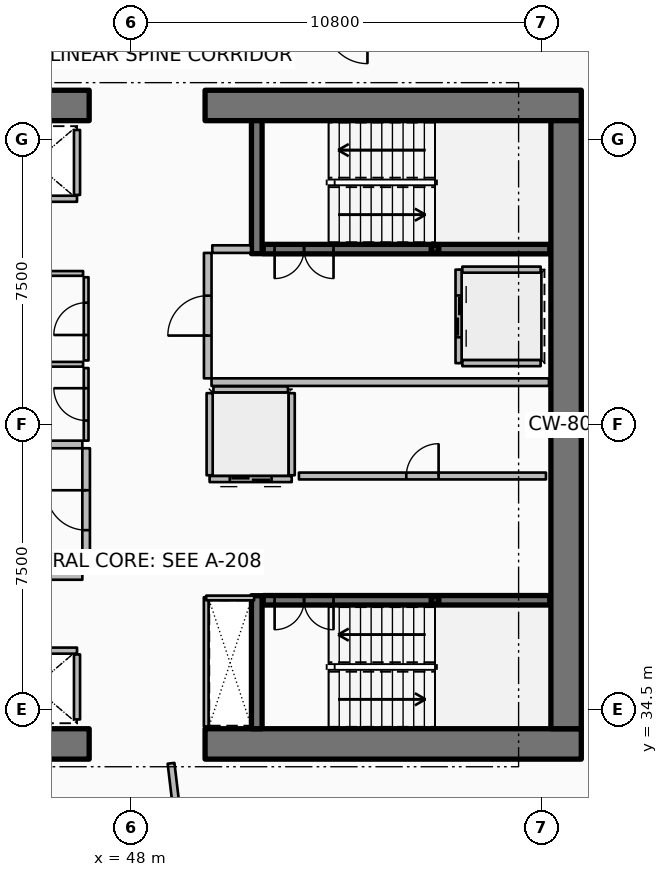
"""IFC4 building model, lengths in metres.
Left out: names, types, materials, properties, quantities, classifications, styles, units other than length and angle.
Written with IfcOpenShell. Run it as: python <this file> out.ifc"""

import sys

from ifc_helpers import new_model, si_unit, direction, frame, frame_2d, origin, origin_2d, place, context, subcontext, project, spatial, rectangle, hollow_rectangle, extrude, element, fill, save


model = new_model("IFC4")
c1 = context("Model", 3, precision=1e-05, world=origin(), true_north=direction((0.0, 1.0)))
c2 = subcontext(c1, "Body", "Model", "MODEL_VIEW")
j1 = project(units=[si_unit("LENGTHUNIT", "METRE"), si_unit("PLANEANGLEUNIT", "RADIAN")], contexts=[c1])
p1 = place(None, origin())
s1 = spatial("IfcSite", under=j1, at=p1, CompositionType="ELEMENT")
p2 = place(p1, origin())
s2 = spatial("IfcBuilding", under=s1, at=p2, CompositionType="ELEMENT")
p3 = place(p2, frame((0.0, 0.0, 157.8)))
s3 = spatial("IfcBuildingStorey", under=s2, at=p3, CompositionType="ELEMENT", Elevation=157.8)
p4 = place(p3, frame((37.0, 33.6, 0.0), z_axis=(0.0, 0.0, 1.0), x_axis=(1.0, 0.0, 0.0)))
e1 = element("IfcWall", 1, at=p4, inside=s3, PredefinedType="SHEAR", context=c2, shape_type="SweptSolid", body=[
    extrude(rectangle(XDim=9.9, YDim=0.8, at=frame_2d((4.95, 0.0))), origin(), (0.0, 0.0, 1.0), 3.75),
])
p5 = place(p3, frame((49.95, 33.6, 0.0), z_axis=(0.0, 0.0, 1.0), x_axis=(1.0, 0.0, 0.0)))
e2 = element("IfcWall", 2, at=p5, inside=s3, PredefinedType="SHEAR", context=c2, shape_type="SweptSolid", body=[
    extrude(rectangle(XDim=9.9, YDim=0.8, at=frame_2d((4.95, 0.0))), origin(), (0.0, 0.0, 1.0), 3.75),
])
p6 = place(p3, frame((37.0, 50.4, 0.0), z_axis=(0.0, 0.0, 1.0), x_axis=(1.0, 0.0, 0.0)))
e3 = element("IfcWall", 3, at=p6, inside=s3, PredefinedType="SHEAR", context=c2, shape_type="SweptSolid", body=[
    extrude(rectangle(XDim=9.9, YDim=0.8, at=frame_2d((4.95, 0.0))), origin(), (0.0, 0.0, 1.0), 3.75),
])
p7 = place(p3, frame((49.95, 50.4, 0.0), z_axis=(0.0, 0.0, 1.0), x_axis=(1.0, 0.0, 0.0)))
e4 = element("IfcWall", 4, at=p7, inside=s3, PredefinedType="SHEAR", context=c2, shape_type="SweptSolid", body=[
    extrude(rectangle(XDim=9.9, YDim=0.8, at=frame_2d((4.95, 0.0))), origin(), (0.0, 0.0, 1.0), 3.75),
])
p8 = place(p3, frame((59.45, 34.0, 0.0), z_axis=(0.0, 0.0, 1.0), x_axis=(0.0, 1.0, 0.0)))
e5 = element("IfcWall", 5, at=p8, inside=s3, PredefinedType="SHEAR", context=c2, shape_type="SweptSolid", body=[
    extrude(rectangle(XDim=16.0, YDim=0.8, at=frame_2d((8.0, 0.0))), origin(), (0.0, 0.0, 1.0), 3.75),
])
for number, where, z_axis, x_axis in (
    (6, (51.31, 46.5, 0.0), (0.0, 0.0, 1.0), (0.0, 1.0, 0.0)),
    (7, (51.31, 34.0, 0.0), (0.0, 0.0, 1.0), (0.0, 1.0, 0.0)),
):
    element("IfcWall", number, at=place(p3, frame(where, z_axis=z_axis, x_axis=x_axis)), inside=s3, PredefinedType="SHEAR", context=c2, shape_type="SweptSolid", body=[
        extrude(rectangle(XDim=3.5, YDim=0.28, at=frame_2d((1.75, 0.0))), origin(), (0.0, 0.0, 1.0), 3.75),
    ])
for number, where, z_axis, x_axis in (
    (8, (56.0, 46.62, 0.0), (0.0, 0.0, 1.0), (1.0, 0.0, 0.0)),
    (9, (56.0, 37.38, 0.0), (0.0, 0.0, 1.0), (1.0, 0.0, 0.0)),
):
    element("IfcColumn", number, at=place(p3, frame(where, z_axis=z_axis, x_axis=x_axis)), inside=s3, PredefinedType="COLUMN", context=c2, shape_type="SweptSolid", body=[
        extrude(hollow_rectangle(XDim=0.2, YDim=0.2, WallThickness=0.01, InnerFilletRadius=0.01, OuterFilletRadius=0.02, at=origin_2d()), origin(), (0.0, 0.0, 1.0), 1.67),
    ])
p9 = place(p3, frame((51.48, 46.62, 0.0), z_axis=(0.0, 0.0, 1.0), x_axis=(1.0, 0.0, 0.0)))
e10 = element("IfcWall", 10, at=p9, inside=s3, PredefinedType="SOLIDWALL", context=c2, shape_type="SweptSolid", body=[
    extrude(rectangle(XDim=7.54, YDim=0.25, at=frame_2d((3.77, 0.0))), origin(), (0.0, 0.0, 1.0), 3.5),
])
p10 = place(p9, frame((0.3, 0.0, 0.0)))
e11 = element("IfcOpeningElement", 11, at=p10, cuts=e10, PredefinedType="OPENING", context=c2, shape_type="SweptSolid", body=[
    extrude(rectangle(XDim=1.55, YDim=2.15, at=frame_2d((0.775, 1.075))), frame((0.0, 0.135, 0.0), z_axis=(0.0, -1.0, 0.0), x_axis=(1.0, 0.0, 0.0)), (0.0, 0.0, 1.0), 0.27),
])
p11 = place(p3, frame((51.48, 37.38, 0.0), z_axis=(0.0, 0.0, 1.0), x_axis=(1.0, 0.0, 0.0)))
e12 = element("IfcWall", 12, at=p11, inside=s3, PredefinedType="SOLIDWALL", context=c2, shape_type="SweptSolid", body=[
    extrude(rectangle(XDim=7.54, YDim=0.25, at=frame_2d((3.77, 0.0))), origin(), (0.0, 0.0, 1.0), 3.5),
])
p12 = place(p11, frame((0.3, 0.0, 0.0)))
e13 = element("IfcOpeningElement", 13, at=p12, cuts=e12, PredefinedType="OPENING", context=c2, shape_type="SweptSolid", body=[
    extrude(rectangle(XDim=1.55, YDim=2.15, at=frame_2d((0.775, 1.075))), frame((0.0, 0.135, 0.0), z_axis=(0.0, -1.0, 0.0), x_axis=(1.0, 0.0, 0.0)), (0.0, 0.0, 1.0), 0.27),
])
p13 = place(p3, frame((46.58, 47.945, 0.0), z_axis=(0.0, 0.0, 1.0), x_axis=(-1.0, 0.0, 0.0)))
e14 = element("IfcWall", 14, at=p13, inside=s3, PredefinedType="PARTITIONING", context=c2, shape_type="SweptSolid", body=[
    extrude(rectangle(XDim=2.26, YDim=0.16, at=frame_2d((1.13, 0.0))), origin(), (0.0, 0.0, 1.0), 3.5),
])
p14 = place(p3, frame((46.58, 48.045, 0.0), z_axis=(0.0, 0.0, 1.0), x_axis=(0.0, 1.0, 0.0)))
e15 = element("IfcWall", 15, at=p14, inside=s3, PredefinedType="PARTITIONING", context=c2, shape_type="SweptSolid", body=[
    extrude(rectangle(XDim=1.71, YDim=0.16, at=frame_2d((0.855, 0.0))), origin(), (0.0, 0.0, 1.0), 3.5),
])
p15 = place(p3, frame((44.32, 36.055, 0.0), z_axis=(0.0, 0.0, 1.0), x_axis=(1.0, 0.0, 0.0)))
e16 = element("IfcWall", 16, at=p15, inside=s3, PredefinedType="PARTITIONING", context=c2, shape_type="SweptSolid", body=[
    extrude(rectangle(XDim=2.26, YDim=0.16, at=frame_2d((1.13, 0.0))), origin(), (0.0, 0.0, 1.0), 3.5),
])
p16 = place(p3, frame((46.58, 34.245, 0.0), z_axis=(0.0, 0.0, 1.0), x_axis=(0.0, 1.0, 0.0)))
e17 = element("IfcWall", 17, at=p16, inside=s3, PredefinedType="PARTITIONING", context=c2, shape_type="SweptSolid", body=[
    extrude(rectangle(XDim=1.71, YDim=0.16, at=frame_2d((0.855, 0.0))), origin(), (0.0, 0.0, 1.0), 3.5),
])
p17 = place(p3, frame((56.62, 46.08, 0.0), z_axis=(0.0, 0.0, 1.0), x_axis=(0.0, -1.0, 0.0)))
e18 = element("IfcWall", 18, at=p17, inside=s3, PredefinedType="PARTITIONING", context=c2, shape_type="SweptSolid", body=[
    extrude(rectangle(XDim=2.46, YDim=0.16, at=frame_2d((1.23, 0.0))), origin(), (0.0, 0.0, 1.0), 3.5),
])
p18 = place(p17, frame((0.68, 0.0, 0.0)))
e19 = element("IfcOpeningElement", 19, at=p18, cuts=e18, PredefinedType="OPENING", context=c2, shape_type="SweptSolid", body=[
    extrude(rectangle(XDim=1.1, YDim=2.1, at=frame_2d((0.55, 1.05))), frame((0.0, 0.09, 0.0), z_axis=(0.0, -1.0, 0.0), x_axis=(1.0, 0.0, 0.0)), (0.0, 0.0, 1.0), 0.18),
])
for number, where, z_axis, x_axis in (
    (20, (56.72, 46.08, 0.0), (0.0, 0.0, 1.0), (1.0, 0.0, 0.0)),
    (21, (56.72, 43.62, 0.0), (0.0, 0.0, 1.0), (1.0, 0.0, 0.0)),
):
    element("IfcWall", number, at=place(p3, frame(where, z_axis=z_axis, x_axis=x_axis)), inside=s3, PredefinedType="PARTITIONING", context=c2, shape_type="SweptSolid", body=[
        extrude(rectangle(XDim=2.06, YDim=0.16, at=frame_2d((1.03, 0.0))), origin(), (0.0, 0.0, 1.0), 3.5),
    ])
p19 = place(p3, frame((52.23, 40.57, 0.0), z_axis=(0.0, 0.0, 1.0), x_axis=(-1.0, 0.0, 0.0)))
e22 = element("IfcWall", 22, at=p19, inside=s3, PredefinedType="PARTITIONING", context=c2, shape_type="SweptSolid", body=[
    extrude(rectangle(XDim=2.16, YDim=0.16, at=frame_2d((1.08, 0.0))), origin(), (0.0, 0.0, 1.0), 3.5),
])
p20 = place(p19, frame((0.53, 0.0, 0.0)))
e23 = element("IfcOpeningElement", 23, at=p20, cuts=e22, PredefinedType="OPENING", context=c2, shape_type="SweptSolid", body=[
    extrude(rectangle(XDim=1.1, YDim=2.1, at=frame_2d((0.55, 1.05))), frame((0.0, 0.09, 0.0), z_axis=(0.0, -1.0, 0.0), x_axis=(1.0, 0.0, 0.0)), (0.0, 0.0, 1.0), 0.18),
])
for number, where, z_axis, x_axis in (
    (24, (52.23, 40.67, 0.0), (0.0, 0.0, 1.0), (0.0, 1.0, 0.0)),
    (25, (50.07, 40.67, 0.0), (0.0, 0.0, 1.0), (0.0, 1.0, 0.0)),
):
    element("IfcWall", number, at=place(p3, frame(where, z_axis=z_axis, x_axis=x_axis)), inside=s3, PredefinedType="PARTITIONING", context=c2, shape_type="SweptSolid", body=[
        extrude(rectangle(XDim=2.16, YDim=0.16, at=frame_2d((1.08, 0.0))), origin(), (0.0, 0.0, 1.0), 3.5),
    ])
p21 = place(p3, frame((50.17, 42.93, 0.0), z_axis=(0.0, 0.0, 1.0), x_axis=(1.0, 0.0, 0.0)))
e26 = element("IfcWall", 26, at=p21, inside=s3, PredefinedType="PARTITIONING", context=c2, shape_type="SweptSolid", body=[
    extrude(rectangle(XDim=1.96, YDim=0.16, at=frame_2d((0.98, 0.0))), origin(), (0.0, 0.0, 1.0), 3.5),
])
p22 = place(p3, frame((52.42, 40.65, 0.0), z_axis=(0.0, 0.0, 1.0), x_axis=(1.0, 0.0, 0.0)))
e27 = element("IfcWall", 27, at=p22, inside=s3, PredefinedType="PARTITIONING", context=c2, shape_type="SweptSolid", body=[
    extrude(rectangle(XDim=6.5, YDim=0.18, at=frame_2d((3.25, 0.0))), origin(), (0.0, 0.0, 1.0), 3.5),
])
p23 = place(p22, frame((2.825, 0.0, 0.0)))
e28 = element("IfcOpeningElement", 28, at=p23, cuts=e27, PredefinedType="OPENING", context=c2, shape_type="SweptSolid", body=[
    extrude(rectangle(XDim=0.85, YDim=2.06, at=frame_2d((0.425, 1.03))), frame((0.0, 0.1, 0.0), z_axis=(0.0, -1.0, 0.0), x_axis=(1.0, 0.0, 0.0)), (0.0, 0.0, 1.0), 0.2),
])
p24 = place(p3, frame((41.35, 38.02, 0.0), z_axis=(0.0, 0.0, 1.0), x_axis=(1.0, 0.0, 0.0)))
e29 = element("IfcWall", 29, at=p24, inside=s3, PredefinedType="PARTITIONING", context=c2, shape_type="SweptSolid", body=[
    extrude(rectangle(XDim=5.37, YDim=0.2, at=frame_2d((2.685, 0.0))), origin(), (0.0, 0.0, 1.0), 3.5),
])
p25 = place(p3, frame((43.92, 41.48, 0.0), z_axis=(0.0, 0.0, 1.0), x_axis=(1.0, 0.0, 0.0)))
e30 = element("IfcWall", 30, at=p25, inside=s3, PredefinedType="PARTITIONING", context=c2, shape_type="SweptSolid", body=[
    extrude(rectangle(XDim=2.8, YDim=0.2, at=frame_2d((1.4, 0.0))), origin(), (0.0, 0.0, 1.0), 3.5),
])
p26 = place(p3, frame((46.82, 38.12, 0.0), z_axis=(0.0, 0.0, 1.0), x_axis=(0.0, 1.0, 0.0)))
e31 = element("IfcWall", 31, at=p26, inside=s3, PredefinedType="PARTITIONING", context=c2, shape_type="SweptSolid", body=[
    extrude(rectangle(XDim=3.26, YDim=0.2, at=frame_2d((1.63, 0.0))), origin(), (0.0, 0.0, 1.0), 3.5),
])
p27 = place(p26, frame((1.105, 0.0, 0.0)))
e32 = element("IfcOpeningElement", 32, at=p27, cuts=e31, PredefinedType="OPENING", context=c2, shape_type="SweptSolid", body=[
    extrude(rectangle(XDim=1.05, YDim=2.1, at=frame_2d((0.525, 1.05))), frame((0.0, 0.11, 0.0), z_axis=(0.0, -1.0, 0.0), x_axis=(1.0, 0.0, 0.0)), (0.0, 0.0, 1.0), 0.22),
])
p28 = place(p3, frame((50.12, 43.12, 0.0), z_axis=(0.0, 0.0, 1.0), x_axis=(1.0, 0.0, 0.0)))
e33 = element("IfcWall", 33, at=p28, inside=s3, PredefinedType="PARTITIONING", context=c2, shape_type="SweptSolid", body=[
    extrude(rectangle(XDim=8.88, YDim=0.2, at=frame_2d((4.44, 0.0))), origin(), (0.0, 0.0, 1.0), 3.5),
])
p29 = place(p3, frame((50.14, 46.62, 0.0), z_axis=(0.0, 0.0, 1.0), x_axis=(1.0, 0.0, 0.0)))
e34 = element("IfcWall", 34, at=p29, inside=s3, PredefinedType="PARTITIONING", context=c2, shape_type="SweptSolid", body=[
    extrude(rectangle(XDim=1.02, YDim=0.2, at=frame_2d((0.51, 0.0))), origin(), (0.0, 0.0, 1.0), 3.5),
])
p30 = place(p3, frame((50.02, 43.22, 0.0), z_axis=(0.0, 0.0, 1.0), x_axis=(0.0, 1.0, 0.0)))
e35 = element("IfcWall", 35, at=p30, inside=s3, PredefinedType="PARTITIONING", context=c2, shape_type="SweptSolid", body=[
    extrude(rectangle(XDim=3.3, YDim=0.2, at=frame_2d((1.65, 0.0))), origin(), (0.0, 0.0, 1.0), 3.5),
])
p31 = place(p30, frame((1.125, 0.0, 0.0)))
e36 = element("IfcOpeningElement", 36, at=p31, cuts=e35, PredefinedType="OPENING", context=c2, shape_type="SweptSolid", body=[
    extrude(rectangle(XDim=1.05, YDim=2.1, at=frame_2d((0.525, 1.05))), frame((0.0, 0.11, 0.0), z_axis=(0.0, -1.0, 0.0), x_axis=(1.0, 0.0, 0.0)), (0.0, 0.0, 1.0), 0.22),
])
p32 = place(p3, frame((49.98, 34.06, 0.0), z_axis=(0.0, 0.0, 1.0), x_axis=(0.0, 1.0, 0.0)))
e37 = element("IfcWall", 37, at=p32, inside=s3, PredefinedType="PARTITIONING", context=c2, shape_type="SweptSolid", body=[
    extrude(rectangle(XDim=3.4, YDim=0.125, at=frame_2d((1.7, 0.0))), origin(), (0.0, 0.0, 1.0), 2.94),
])
p33 = place(p3, frame((49.98, 37.44, 0.0), z_axis=(0.0, 0.0, 1.0), x_axis=(1.0, 0.0, 0.0)))
e38 = element("IfcWall", 38, at=p33, inside=s3, PredefinedType="PARTITIONING", context=c2, shape_type="SweptSolid", body=[
    extrude(rectangle(XDim=1.26, YDim=0.125, at=frame_2d((0.63, 0.0))), origin(), (0.0, 0.0, 1.0), 2.94),
])
p34 = place(p3, frame((44.03, 43.59, 0.0), z_axis=(0.0, 0.0, 1.0), x_axis=(1.0, 0.0, 0.0)))
e39 = element("IfcWall", 39, at=p34, inside=s3, PredefinedType="PARTITIONING", context=c2, shape_type="SweptSolid", body=[
    extrude(rectangle(XDim=2.71, YDim=0.125, at=frame_2d((1.355, 0.0))), origin(), (0.0, 0.0, 1.0), 2.94),
])
p35 = place(p3, frame((46.82, 41.58, 0.0), z_axis=(0.0, 0.0, 1.0), x_axis=(0.0, 1.0, 0.0)))
e40 = element("IfcWall", 40, at=p35, inside=s3, PredefinedType="PARTITIONING", context=c2, shape_type="SweptSolid", body=[
    extrude(rectangle(XDim=1.91, YDim=0.125, at=frame_2d((0.955, 0.0))), origin(), (0.0, 0.0, 1.0), 2.94),
])
p36 = place(p35, frame((0.53, 0.0, 0.0)))
e41 = element("IfcOpeningElement", 41, at=p36, cuts=e40, PredefinedType="OPENING", context=c2, shape_type="SweptSolid", body=[
    extrude(rectangle(XDim=0.85, YDim=2.06, at=frame_2d((0.425, 1.03))), frame((0.0, 0.073, 0.0), z_axis=(0.0, -1.0, 0.0), x_axis=(1.0, 0.0, 0.0)), (0.0, 0.0, 1.0), 0.145),
])
p37 = place(p3, frame((46.82, 43.69, 0.0), z_axis=(0.0, 0.0, 1.0), x_axis=(0.0, 1.0, 0.0)))
e42 = element("IfcWall", 42, at=p37, inside=s3, PredefinedType="PARTITIONING", context=c2, shape_type="SweptSolid", body=[
    extrude(rectangle(XDim=2.19, YDim=0.125, at=frame_2d((1.095, 0.0))), origin(), (0.0, 0.0, 1.0), 2.94),
])
p38 = place(p37, frame((0.67, 0.0, 0.0)))
e43 = element("IfcOpeningElement", 43, at=p38, cuts=e42, PredefinedType="OPENING", context=c2, shape_type="SweptSolid", body=[
    extrude(rectangle(XDim=0.85, YDim=2.06, at=frame_2d((0.425, 1.03))), frame((0.0, 0.073, 0.0), z_axis=(0.0, -1.0, 0.0), x_axis=(1.0, 0.0, 0.0)), (0.0, 0.0, 1.0), 0.145),
])
p39 = place(p3, frame((45.48, 45.98, 0.0), z_axis=(0.0, 0.0, 1.0), x_axis=(1.0, 0.0, 0.0)))
e44 = element("IfcWall", 44, at=p39, inside=s3, PredefinedType="PARTITIONING", context=c2, shape_type="SweptSolid", body=[
    extrude(rectangle(XDim=1.26, YDim=0.125, at=frame_2d((0.63, 0.0))), origin(), (0.0, 0.0, 1.0), 2.94),
])
p40 = place(p3, frame((49.054, 33.091, 0.0), z_axis=(0.0, 0.0, 1.0), x_axis=(0.117543744731, -0.993067705685, 0.0)))
e45 = element("IfcWall", 45, at=p40, inside=s3, PredefinedType="PARTITIONING", context=c2, shape_type="SweptSolid", body=[
    extrude(rectangle(XDim=12.763, YDim=0.18, at=frame_2d((6.382, 0.0))), origin(), (0.0, 0.0, 1.0), 2.94),
])
p41 = place(p3, frame((63.52, 50.815, 0.0), z_axis=(0.0, 0.0, 1.0), x_axis=(-0.649447526186, 0.760406411553, 0.0)))
e46 = element("IfcWall", 46, at=p41, inside=s3, PredefinedType="PARTITIONING", context=c2, shape_type="SweptSolid", body=[
    extrude(rectangle(XDim=6.753, YDim=0.125, at=frame_2d((3.376, 0.0))), origin(), (0.0, 0.0, 1.0), 2.94),
])
p42 = place(p41, frame((2.926, 0.0, 0.0)))
e47 = element("IfcOpeningElement", 47, at=p42, cuts=e46, PredefinedType="OPENING", context=c2, shape_type="SweptSolid", body=[
    extrude(rectangle(XDim=0.9, YDim=2.08, at=frame_2d((0.45, 1.04))), frame((0.0, 0.073, 0.0), z_axis=(0.0, -1.0, 0.0), x_axis=(1.0, 0.0, 0.0)), (0.0, 0.0, 1.0), 0.145),
])
p43 = place(p10, origin())
e48 = element("IfcDoor", 48, at=p43, inside=s3, OperationType="DOUBLE_DOOR_SINGLE_SWING", PredefinedType="DOOR", context=c2, shape_type="SweptSolid", body=[
    extrude(rectangle(XDim=1.55, YDim=2.15, at=frame_2d((0.775, 1.075))), frame((0.0, 0.025, 0.0), z_axis=(0.0, -1.0, 0.0), x_axis=(1.0, 0.0, 0.0)), (0.0, 0.0, 1.0), 0.05),
])
fill(e11, e48)
p44 = place(p12, origin())
e49 = element("IfcDoor", 49, at=p44, inside=s3, OperationType="DOUBLE_DOOR_SINGLE_SWING", PredefinedType="DOOR", context=c2, shape_type="SweptSolid", body=[
    extrude(rectangle(XDim=1.55, YDim=2.15, at=frame_2d((0.775, 1.075))), frame((0.0, 0.025, 0.0), z_axis=(0.0, -1.0, 0.0), x_axis=(1.0, 0.0, 0.0)), (0.0, 0.0, 1.0), 0.05),
])
fill(e13, e49)
p45 = place(p18, origin())
e50 = element("IfcDoor", 50, at=p45, inside=s3, OperationType="DOUBLE_DOOR_SLIDING", PredefinedType="DOOR", context=c2, shape_type="SweptSolid", body=[
    extrude(rectangle(XDim=1.1, YDim=2.1, at=frame_2d((0.55, 1.05))), frame((0.0, 0.025, 0.0), z_axis=(0.0, -1.0, 0.0), x_axis=(1.0, 0.0, 0.0)), (0.0, 0.0, 1.0), 0.05),
])
fill(e19, e50)
p46 = place(p20, origin())
e51 = element("IfcDoor", 51, at=p46, inside=s3, OperationType="DOUBLE_DOOR_SLIDING", PredefinedType="DOOR", context=c2, shape_type="SweptSolid", body=[
    extrude(rectangle(XDim=1.1, YDim=2.1, at=frame_2d((0.55, 1.05))), frame((0.0, 0.025, 0.0), z_axis=(0.0, -1.0, 0.0), x_axis=(1.0, 0.0, 0.0)), (0.0, 0.0, 1.0), 0.05),
])
fill(e23, e51)
p47 = place(p23, origin())
e52 = element("IfcDoor", 52, at=p47, inside=s3, OperationType="SINGLE_SWING_RIGHT", PredefinedType="DOOR", context=c2, shape_type="SweptSolid", body=[
    extrude(rectangle(XDim=0.85, YDim=2.06, at=frame_2d((0.425, 1.03))), frame((0.0, 0.025, 0.0), z_axis=(0.0, -1.0, 0.0), x_axis=(1.0, 0.0, 0.0)), (0.0, 0.0, 1.0), 0.05),
])
fill(e28, e52)
p48 = place(p27, origin())
e53 = element("IfcDoor", 53, at=p48, inside=s3, OperationType="SINGLE_SWING_RIGHT", PredefinedType="DOOR", context=c2, shape_type="SweptSolid", body=[
    extrude(rectangle(XDim=1.05, YDim=2.1, at=frame_2d((0.525, 1.05))), frame((0.0, 0.025, 0.0), z_axis=(0.0, -1.0, 0.0), x_axis=(1.0, 0.0, 0.0)), (0.0, 0.0, 1.0), 0.05),
])
fill(e32, e53)
p49 = place(p31, origin())
e54 = element("IfcDoor", 54, at=p49, inside=s3, OperationType="SINGLE_SWING_LEFT", PredefinedType="DOOR", context=c2, shape_type="SweptSolid", body=[
    extrude(rectangle(XDim=1.05, YDim=2.1, at=frame_2d((0.525, 1.05))), frame((0.0, 0.025, 0.0), z_axis=(0.0, -1.0, 0.0), x_axis=(1.0, 0.0, 0.0)), (0.0, 0.0, 1.0), 0.05),
])
fill(e36, e54)
p50 = place(p36, origin())
e55 = element("IfcDoor", 55, at=p50, inside=s3, OperationType="SINGLE_SWING_RIGHT", PredefinedType="DOOR", context=c2, shape_type="SweptSolid", body=[
    extrude(rectangle(XDim=0.85, YDim=2.06, at=frame_2d((0.425, 1.03))), frame((0.0, 0.025, 0.0), z_axis=(0.0, -1.0, 0.0), x_axis=(1.0, 0.0, 0.0)), (0.0, 0.0, 1.0), 0.05),
])
fill(e41, e55)
p51 = place(p38, origin())
e56 = element("IfcDoor", 56, at=p51, inside=s3, OperationType="SINGLE_SWING_LEFT", PredefinedType="DOOR", context=c2, shape_type="SweptSolid", body=[
    extrude(rectangle(XDim=0.85, YDim=2.06, at=frame_2d((0.425, 1.03))), frame((0.0, 0.025, 0.0), z_axis=(0.0, -1.0, 0.0), x_axis=(1.0, 0.0, 0.0)), (0.0, 0.0, 1.0), 0.05),
])
fill(e43, e56)
save(model, sys.argv[1])
